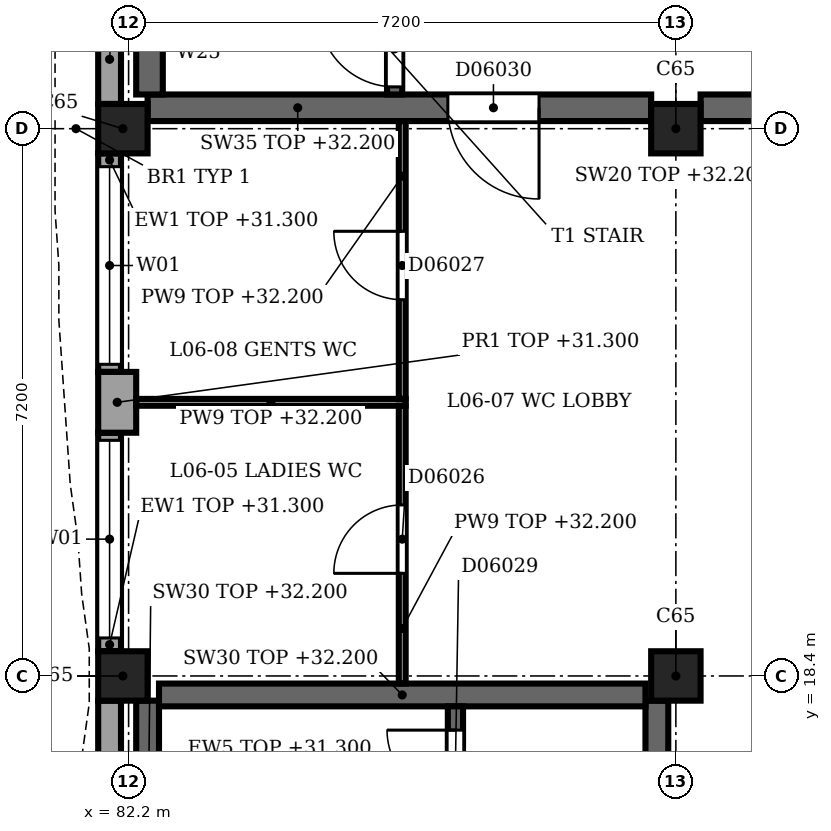
"""IFC4 building model, lengths in metres.
Left out: names, types, materials, properties, quantities, classifications, styles, units other than length and angle.
Written with IfcOpenShell. Run it as: python <this file> out.ifc"""

import sys

from ifc_helpers import new_model, si_unit, direction, frame, frame_2d, origin, origin_2d, place, context, subcontext, project, spatial, rectangle, extrude, element, fill, save


model = new_model("IFC4")
c1 = context("Model", 3, precision=1e-05, world=origin(), true_north=direction((0.0, 1.0)))
c2 = subcontext(c1, "Body", "Model", "MODEL_VIEW")
j1 = project(units=[si_unit("LENGTHUNIT", "METRE"), si_unit("PLANEANGLEUNIT", "RADIAN")], contexts=[c1])
p1 = place(None, origin())
s1 = spatial("IfcSite", under=j1, at=p1, CompositionType="ELEMENT")
p2 = place(p1, origin())
s2 = spatial("IfcBuilding", under=s1, at=p2, CompositionType="ELEMENT")
p3 = place(p2, frame((0.0, 0.0, 27.9)))
s3 = spatial("IfcBuildingStorey", under=s2, at=p3, CompositionType="ELEMENT", Elevation=27.9)
for number, where, z_axis, x_axis in (
    (1, (82.125, 18.4, 0.0), (0.0, 0.0, 1.0), (1.0, 0.0, 0.0)),
    (2, (82.125, 25.6, 0.0), (0.0, 0.0, 1.0), (1.0, 0.0, 0.0)),
    (3, (89.4, 18.4, 0.0), (0.0, 0.0, 1.0), (1.0, 0.0, 0.0)),
    (4, (89.4, 25.6, 0.0), (0.0, 0.0, 1.0), (1.0, 0.0, 0.0)),
):
    element("IfcColumn", number, at=place(p3, frame(where, z_axis=z_axis, x_axis=x_axis)), inside=s3, PredefinedType="COLUMN", context=c2, shape_type="SweptSolid", body=[
        extrude(rectangle(XDim=0.65, YDim=0.65, at=origin_2d()), origin(), (0.0, 0.0, 1.0), 4.5),
    ])
p4 = place(p3, frame((82.05, 21.6, 0.0), z_axis=(0.0, 0.0, 1.0), x_axis=(0.0, 1.0, 0.0)))
e5 = element("IfcWall", 5, at=p4, inside=s3, PredefinedType="SOLIDWALL", context=c2, shape_type="SweptSolid", body=[
    extrude(rectangle(XDim=0.8, YDim=0.5, at=frame_2d((0.4, 0.0))), origin(), (0.0, 0.0, 1.0), 3.4),
])
p5 = place(p3, frame((81.95, 15.2, 0.0), z_axis=(0.0, 0.0, 1.0), x_axis=(0.0, 1.0, 0.0)))
e6 = element("IfcWall", 6, at=p5, inside=s3, PredefinedType="SOLIDWALL", context=c2, shape_type="SweptSolid", body=[
    extrude(rectangle(XDim=2.875, YDim=0.3, at=frame_2d((1.438, 0.0))), origin(), (0.0, 0.0, 1.0), 3.4),
])
p6 = place(p3, frame((81.95, 18.725, 0.0), z_axis=(0.0, 0.0, 1.0), x_axis=(0.0, 1.0, 0.0)))
e7 = element("IfcWall", 7, at=p6, inside=s3, PredefinedType="SOLIDWALL", context=c2, shape_type="SweptSolid", body=[
    extrude(rectangle(XDim=2.875, YDim=0.3, at=frame_2d((1.438, 0.0))), origin(), (0.0, 0.0, 1.0), 3.4),
])
p7 = place(p6, frame((0.175, 0.0, 0.9)))
e8 = element("IfcOpeningElement", 8, at=p7, cuts=e7, PredefinedType="OPENING", context=c2, shape_type="SweptSolid", body=[
    extrude(rectangle(XDim=2.6, YDim=2.4, at=frame_2d((1.3, 1.2))), frame((0.0, 0.16, 0.0), z_axis=(0.0, -1.0, 0.0), x_axis=(1.0, 0.0, 0.0)), (0.0, 0.0, 1.0), 0.32),
])
p8 = place(p3, frame((81.95, 22.4, 0.0), z_axis=(0.0, 0.0, 1.0), x_axis=(0.0, 1.0, 0.0)))
e9 = element("IfcWall", 9, at=p8, inside=s3, PredefinedType="SOLIDWALL", context=c2, shape_type="SweptSolid", body=[
    extrude(rectangle(XDim=2.875, YDim=0.3, at=frame_2d((1.438, 0.0))), origin(), (0.0, 0.0, 1.0), 3.4),
])
p9 = place(p8, frame((0.1, 0.0, 0.9)))
e10 = element("IfcOpeningElement", 10, at=p9, cuts=e9, PredefinedType="OPENING", context=c2, shape_type="SweptSolid", body=[
    extrude(rectangle(XDim=2.6, YDim=2.4, at=frame_2d((1.3, 1.2))), frame((0.0, 0.16, 0.0), z_axis=(0.0, -1.0, 0.0), x_axis=(1.0, 0.0, 0.0)), (0.0, 0.0, 1.0), 0.32),
])
p10 = place(p3, frame((81.95, 25.925, 0.0), z_axis=(0.0, 0.0, 1.0), x_axis=(0.0, 1.0, 0.0)))
e11 = element("IfcWall", 11, at=p10, inside=s3, PredefinedType="SOLIDWALL", context=c2, shape_type="SweptSolid", body=[
    extrude(rectangle(XDim=2.875, YDim=0.3, at=frame_2d((1.438, 0.0))), origin(), (0.0, 0.0, 1.0), 3.4),
])
p11 = place(p10, frame((1.175, 0.0, 1.2)))
e12 = element("IfcOpeningElement", 12, at=p11, cuts=e11, PredefinedType="OPENING", context=c2, shape_type="SweptSolid", body=[
    extrude(rectangle(XDim=0.6, YDim=1.8, at=frame_2d((0.3, 0.9))), frame((0.0, 0.16, 0.0), z_axis=(0.0, -1.0, 0.0), x_axis=(1.0, 0.0, 0.0)), (0.0, 0.0, 1.0), 0.32),
])
p12 = place(p3, frame((82.45, 25.875, 0.0), z_axis=(0.0, 0.0, 1.0), x_axis=(1.0, 0.0, 0.0)))
e13 = element("IfcWall", 13, at=p12, inside=s3, PredefinedType="SHEAR", context=c2, shape_type="SweptSolid", body=[
    extrude(rectangle(XDim=6.625, YDim=0.35, at=frame_2d((3.312, 0.0))), origin(), (0.0, 0.0, 1.0), 4.3),
])
p13 = place(p12, frame((3.95, 0.0, 0.0)))
e14 = element("IfcOpeningElement", 14, at=p13, cuts=e13, PredefinedType="OPENING", context=c2, shape_type="SweptSolid", body=[
    extrude(rectangle(XDim=1.2, YDim=2.1, at=frame_2d((0.6, 1.05))), frame((0.0, 0.185, 0.0), z_axis=(0.0, -1.0, 0.0), x_axis=(1.0, 0.0, 0.0)), (0.0, 0.0, 1.0), 0.37),
])
p14 = place(p3, frame((89.725, 25.875, 0.0), z_axis=(0.0, 0.0, 1.0), x_axis=(1.0, 0.0, 0.0)))
e15 = element("IfcWall", 15, at=p14, inside=s3, PredefinedType="SHEAR", context=c2, shape_type="SweptSolid", body=[
    extrude(rectangle(XDim=6.55, YDim=0.35, at=frame_2d((3.275, 0.0))), origin(), (0.0, 0.0, 1.0), 4.3),
])
p15 = place(p14, frame((2.675, 0.0, 0.0)))
e16 = element("IfcOpeningElement", 16, at=p15, cuts=e15, PredefinedType="OPENING", context=c2, shape_type="SweptSolid", body=[
    extrude(rectangle(XDim=1.8, YDim=2.1, at=frame_2d((0.9, 1.05))), frame((0.0, 0.185, 0.0), z_axis=(0.0, -1.0, 0.0), x_axis=(1.0, 0.0, 0.0)), (0.0, 0.0, 1.0), 0.37),
])
p16 = place(p3, frame((82.475, 26.05, 0.0), z_axis=(0.0, 0.0, 1.0), x_axis=(0.0, 1.0, 0.0)))
e17 = element("IfcWall", 17, at=p16, inside=s3, PredefinedType="SHEAR", context=c2, shape_type="SweptSolid", body=[
    extrude(rectangle(XDim=6.3, YDim=0.35, at=frame_2d((3.15, 0.0))), origin(), (0.0, 0.0, 1.0), 4.3),
])
p17 = place(p16, frame((1.05, 0.0, 1.2)))
e18 = element("IfcOpeningElement", 18, at=p17, cuts=e17, PredefinedType="OPENING", context=c2, shape_type="SweptSolid", body=[
    extrude(rectangle(XDim=0.6, YDim=1.8, at=frame_2d((0.3, 0.9))), frame((0.0, 0.185, 0.0), z_axis=(0.0, -1.0, 0.0), x_axis=(1.0, 0.0, 0.0)), (0.0, 0.0, 1.0), 0.37),
])
p18 = place(p16, frame((4.65, 0.0, 1.2)))
e19 = element("IfcOpeningElement", 19, at=p18, cuts=e17, PredefinedType="OPENING", context=c2, shape_type="SweptSolid", body=[
    extrude(rectangle(XDim=0.6, YDim=1.8, at=frame_2d((0.3, 0.9))), frame((0.0, 0.185, 0.0), z_axis=(0.0, -1.0, 0.0), x_axis=(1.0, 0.0, 0.0)), (0.0, 0.0, 1.0), 0.37),
])
p19 = place(p3, frame((85.7, 26.05, 0.0), z_axis=(0.0, 0.0, 1.0), x_axis=(0.0, 1.0, 0.0)))
e20 = element("IfcWall", 20, at=p19, inside=s3, PredefinedType="SHEAR", context=c2, shape_type="SweptSolid", body=[
    extrude(rectangle(XDim=6.3, YDim=0.2, at=frame_2d((3.15, 0.0))), origin(), (0.0, 0.0, 1.0), 4.3),
])
p20 = place(p19, frame((0.1, 0.0, 0.0)))
e21 = element("IfcOpeningElement", 21, at=p20, cuts=e20, PredefinedType="OPENING", context=c2, shape_type="SweptSolid", body=[
    extrude(rectangle(XDim=1.0, YDim=2.1, at=frame_2d((0.5, 1.05))), frame((0.0, 0.11, 0.0), z_axis=(0.0, -1.0, 0.0), x_axis=(1.0, 0.0, 0.0)), (0.0, 0.0, 1.0), 0.22),
])
p21 = place(p3, frame((89.15, 11.525, 0.0), z_axis=(0.0, 0.0, 1.0), x_axis=(0.0, 1.0, 0.0)))
e22 = element("IfcWall", 22, at=p21, inside=s3, PredefinedType="SHEAR", context=c2, shape_type="SweptSolid", body=[
    extrude(rectangle(XDim=6.55, YDim=0.3, at=frame_2d((3.275, 0.0))), origin(), (0.0, 0.0, 1.0), 4.3),
])
p22 = place(p21, frame((4.275, 0.0, 0.0)))
e23 = element("IfcOpeningElement", 23, at=p22, cuts=e22, PredefinedType="OPENING", context=c2, shape_type="SweptSolid", body=[
    extrude(rectangle(XDim=1.2, YDim=2.1, at=frame_2d((0.6, 1.05))), frame((0.0, 0.16, 0.0), z_axis=(0.0, -1.0, 0.0), x_axis=(1.0, 0.0, 0.0)), (0.0, 0.0, 1.0), 0.32),
])
p23 = place(p3, frame((82.45, 11.525, 0.0), z_axis=(0.0, 0.0, 1.0), x_axis=(0.0, 1.0, 0.0)))
e24 = element("IfcWall", 24, at=p23, inside=s3, PredefinedType="SHEAR", context=c2, shape_type="SweptSolid", body=[
    extrude(rectangle(XDim=6.55, YDim=0.3, at=frame_2d((3.275, 0.0))), origin(), (0.0, 0.0, 1.0), 4.3),
])
p24 = place(p23, frame((1.175, 0.0, 1.2)))
e25 = element("IfcOpeningElement", 25, at=p24, cuts=e24, PredefinedType="OPENING", context=c2, shape_type="SweptSolid", body=[
    extrude(rectangle(XDim=0.6, YDim=1.8, at=frame_2d((0.3, 0.9))), frame((0.0, 0.16, 0.0), z_axis=(0.0, -1.0, 0.0), x_axis=(1.0, 0.0, 0.0)), (0.0, 0.0, 1.0), 0.32),
])
p25 = place(p3, frame((82.6, 18.15, 0.0), z_axis=(0.0, 0.0, 1.0), x_axis=(1.0, 0.0, 0.0)))
e26 = element("IfcWall", 26, at=p25, inside=s3, PredefinedType="SHEAR", context=c2, shape_type="SweptSolid", body=[
    extrude(rectangle(XDim=6.4, YDim=0.3, at=frame_2d((3.2, 0.0))), origin(), (0.0, 0.0, 1.0), 4.3),
])
p26 = place(p3, frame((86.5, 18.0, 0.0), z_axis=(0.0, 0.0, 1.0), x_axis=(0.0, -1.0, 0.0)))
e27 = element("IfcWall", 27, at=p26, inside=s3, PredefinedType="SHEAR", context=c2, shape_type="SweptSolid", body=[
    extrude(rectangle(XDim=3.25, YDim=0.2, at=frame_2d((1.625, 0.0))), origin(), (0.0, 0.0, 1.0), 4.3),
])
p27 = place(p26, frame((2.038, 0.0, 0.0)))
e28 = element("IfcOpeningElement", 28, at=p27, cuts=e27, PredefinedType="OPENING", context=c2, shape_type="SweptSolid", body=[
    extrude(rectangle(XDim=0.9, YDim=2.1, at=frame_2d((0.45, 1.05))), frame((0.0, 0.11, 0.0), z_axis=(0.0, -1.0, 0.0), x_axis=(1.0, 0.0, 0.0)), (0.0, 0.0, 1.0), 0.22),
])
p28 = place(p26, frame((0.312, 0.0, 0.0)))
e29 = element("IfcOpeningElement", 29, at=p28, cuts=e27, PredefinedType="OPENING", context=c2, shape_type="SweptSolid", body=[
    extrude(rectangle(XDim=0.9, YDim=2.1, at=frame_2d((0.45, 1.05))), frame((0.0, 0.11, 0.0), z_axis=(0.0, -1.0, 0.0), x_axis=(1.0, 0.0, 0.0)), (0.0, 0.0, 1.0), 0.22),
])
p29 = place(p3, frame((82.3, 22.0, 0.0), z_axis=(0.0, 0.0, 1.0), x_axis=(1.0, 0.0, 0.0)))
e30 = element("IfcWall", 30, at=p29, inside=s3, PredefinedType="PARTITIONING", context=c2, shape_type="SweptSolid", body=[
    extrude(rectangle(XDim=3.545, YDim=0.09, at=frame_2d((1.772, 0.0))), origin(), (0.0, 0.0, 1.0), 4.3),
])
p30 = place(p3, frame((85.8, 18.3, 0.0), z_axis=(0.0, 0.0, 1.0), x_axis=(0.0, 1.0, 0.0)))
e31 = element("IfcWall", 31, at=p30, inside=s3, PredefinedType="PARTITIONING", context=c2, shape_type="SweptSolid", body=[
    extrude(rectangle(XDim=3.655, YDim=0.09, at=frame_2d((1.828, 0.0))), origin(), (0.0, 0.0, 1.0), 4.3),
])
p31 = place(p30, frame((1.45, 0.0, 0.0)))
e32 = element("IfcOpeningElement", 32, at=p31, cuts=e31, PredefinedType="OPENING", context=c2, shape_type="SweptSolid", body=[
    extrude(rectangle(XDim=0.9, YDim=2.1, at=frame_2d((0.45, 1.05))), frame((0.0, 0.055, 0.0), z_axis=(0.0, -1.0, 0.0), x_axis=(1.0, 0.0, 0.0)), (0.0, 0.0, 1.0), 0.11),
])
p32 = place(p3, frame((85.8, 22.045, 0.0), z_axis=(0.0, 0.0, 1.0), x_axis=(0.0, 1.0, 0.0)))
e33 = element("IfcWall", 33, at=p32, inside=s3, PredefinedType="PARTITIONING", context=c2, shape_type="SweptSolid", body=[
    extrude(rectangle(XDim=3.655, YDim=0.09, at=frame_2d((1.828, 0.0))), origin(), (0.0, 0.0, 1.0), 4.3),
])
p33 = place(p32, frame((1.305, 0.0, 0.0)))
e34 = element("IfcOpeningElement", 34, at=p33, cuts=e33, PredefinedType="OPENING", context=c2, shape_type="SweptSolid", body=[
    extrude(rectangle(XDim=0.9, YDim=2.1, at=frame_2d((0.45, 1.05))), frame((0.0, 0.055, 0.0), z_axis=(0.0, -1.0, 0.0), x_axis=(1.0, 0.0, 0.0)), (0.0, 0.0, 1.0), 0.11),
])
p34 = place(p7, origin())
e35 = element("IfcWindow", 35, at=p34, inside=s3, PartitioningType="SINGLE_PANEL", PredefinedType="WINDOW", context=c2, shape_type="SweptSolid", body=[
    extrude(rectangle(XDim=2.6, YDim=2.4, at=frame_2d((1.3, 1.2))), frame((0.0, 0.03, 0.0), z_axis=(0.0, -1.0, 0.0), x_axis=(1.0, 0.0, 0.0)), (0.0, 0.0, 1.0), 0.06),
])
fill(e8, e35)
p35 = place(p9, origin())
e36 = element("IfcWindow", 36, at=p35, inside=s3, PartitioningType="SINGLE_PANEL", PredefinedType="WINDOW", context=c2, shape_type="SweptSolid", body=[
    extrude(rectangle(XDim=2.6, YDim=2.4, at=frame_2d((1.3, 1.2))), frame((0.0, 0.03, 0.0), z_axis=(0.0, -1.0, 0.0), x_axis=(1.0, 0.0, 0.0)), (0.0, 0.0, 1.0), 0.06),
])
fill(e10, e36)
p36 = place(p13, origin())
e37 = element("IfcDoor", 37, at=p36, inside=s3, OperationType="SINGLE_SWING_RIGHT", PredefinedType="DOOR", context=c2, shape_type="SweptSolid", body=[
    extrude(rectangle(XDim=1.2, YDim=2.1, at=frame_2d((0.6, 1.05))), frame((0.0, 0.025, 0.0), z_axis=(0.0, -1.0, 0.0), x_axis=(1.0, 0.0, 0.0)), (0.0, 0.0, 1.0), 0.05),
])
fill(e14, e37)
p37 = place(p20, origin())
e38 = element("IfcDoor", 38, at=p37, inside=s3, OperationType="SINGLE_SWING_LEFT", PredefinedType="DOOR", context=c2, shape_type="SweptSolid", body=[
    extrude(rectangle(XDim=1.0, YDim=2.1, at=frame_2d((0.5, 1.05))), frame((0.0, 0.025, 0.0), z_axis=(0.0, -1.0, 0.0), x_axis=(1.0, 0.0, 0.0)), (0.0, 0.0, 1.0), 0.05),
])
fill(e21, e38)
p38 = place(p28, origin())
e39 = element("IfcDoor", 39, at=p38, inside=s3, OperationType="SINGLE_SWING_LEFT", PredefinedType="DOOR", context=c2, shape_type="SweptSolid", body=[
    extrude(rectangle(XDim=0.9, YDim=2.1, at=frame_2d((0.45, 1.05))), frame((0.0, 0.025, 0.0), z_axis=(0.0, -1.0, 0.0), x_axis=(1.0, 0.0, 0.0)), (0.0, 0.0, 1.0), 0.05),
])
fill(e29, e39)
p39 = place(p31, origin())
e40 = element("IfcDoor", 40, at=p39, inside=s3, OperationType="SINGLE_SWING_RIGHT", PredefinedType="DOOR", context=c2, shape_type="SweptSolid", body=[
    extrude(rectangle(XDim=0.9, YDim=2.1, at=frame_2d((0.45, 1.05))), frame((0.0, 0.025, 0.0), z_axis=(0.0, -1.0, 0.0), x_axis=(1.0, 0.0, 0.0)), (0.0, 0.0, 1.0), 0.05),
])
fill(e32, e40)
p40 = place(p33, origin())
e41 = element("IfcDoor", 41, at=p40, inside=s3, OperationType="SINGLE_SWING_LEFT", PredefinedType="DOOR", context=c2, shape_type="SweptSolid", body=[
    extrude(rectangle(XDim=0.9, YDim=2.1, at=frame_2d((0.45, 1.05))), frame((0.0, 0.025, 0.0), z_axis=(0.0, -1.0, 0.0), x_axis=(1.0, 0.0, 0.0)), (0.0, 0.0, 1.0), 0.05),
])
fill(e34, e41)
save(model, sys.argv[1])
